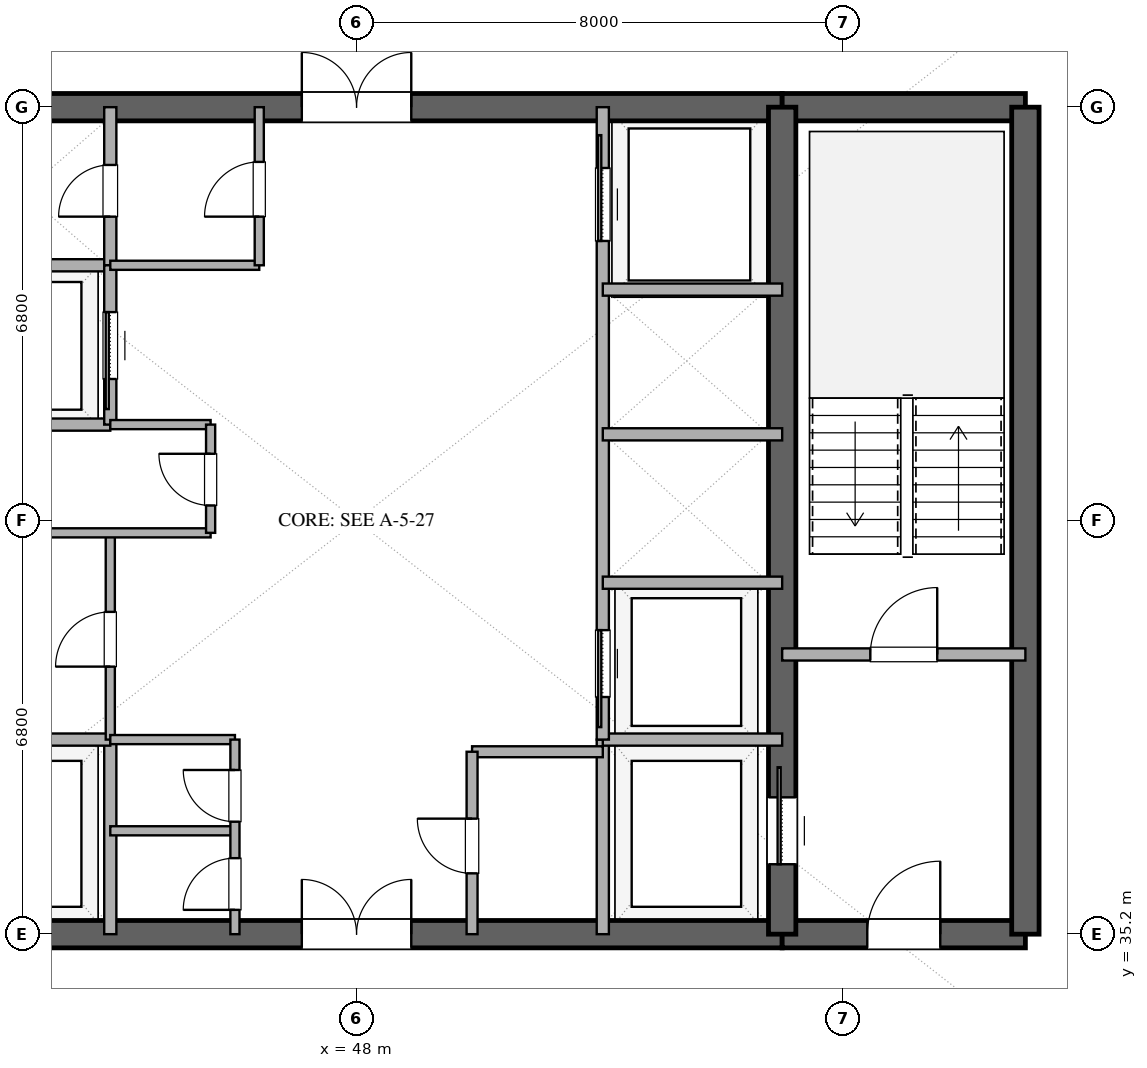
"""IFC4 building model, lengths in metres.
Left out: names, types, materials, properties, quantities, classifications, styles, units other than length and angle.
Written with IfcOpenShell. Run it as: python <this file> out.ifc"""

import sys

from ifc_helpers import new_model, si_unit, direction, frame, frame_2d, origin, place, context, subcontext, project, spatial, rectangle, extrude, element, fill, save


model = new_model("IFC4")
c1 = context("Model", 3, precision=1e-05, world=origin(), true_north=direction((0.0, 1.0)))
c2 = subcontext(c1, "Body", "Model", "MODEL_VIEW")
j1 = project(units=[si_unit("LENGTHUNIT", "METRE"), si_unit("PLANEANGLEUNIT", "RADIAN")], contexts=[c1])
p1 = place(None, origin())
s1 = spatial("IfcSite", under=j1, at=p1, CompositionType="ELEMENT")
p2 = place(p1, origin())
s2 = spatial("IfcBuilding", under=s1, at=p2, CompositionType="ELEMENT")
p3 = place(p2, frame((0.0, 0.0, 179.4)))
s3 = spatial("IfcBuildingStorey", under=s2, at=p3, CompositionType="ELEMENT", Elevation=179.4)
p4 = place(p3, frame((41.0, 35.2, 0.0), z_axis=(0.0, 0.0, 1.0), x_axis=(1.0, 0.0, 0.0)))
e1 = element("IfcWall", 1, at=p4, inside=s3, PredefinedType="SHEAR", context=c2, shape_type="SweptSolid", body=[
    extrude(rectangle(XDim=14.0, YDim=0.45, at=frame_2d((7.0, 0.0))), origin(), (0.0, 0.0, 1.0), 3.38),
])
p5 = place(p4, frame((6.1, 0.0, 0.0)))
e2 = element("IfcOpeningElement", 2, at=p5, cuts=e1, PredefinedType="OPENING", context=c2, shape_type="SweptSolid", body=[
    extrude(rectangle(XDim=1.8, YDim=2.25, at=frame_2d((0.9, 1.125))), frame((0.0, 0.235, 0.0), z_axis=(0.0, -1.0, 0.0), x_axis=(1.0, 0.0, 0.0)), (0.0, 0.0, 1.0), 0.47),
])
p6 = place(p3, frame((55.0, 35.2, 0.0), z_axis=(0.0, 0.0, 1.0), x_axis=(1.0, 0.0, 0.0)))
e3 = element("IfcWall", 3, at=p6, inside=s3, PredefinedType="SHEAR", context=c2, shape_type="SweptSolid", body=[
    extrude(rectangle(XDim=4.0, YDim=0.45, at=frame_2d((2.0, 0.0))), origin(), (0.0, 0.0, 1.0), 3.38),
])
p7 = place(p6, frame((1.4, 0.0, 0.0)))
e4 = element("IfcOpeningElement", 4, at=p7, cuts=e3, PredefinedType="OPENING", context=c2, shape_type="SweptSolid", body=[
    extrude(rectangle(XDim=1.2, YDim=2.15, at=frame_2d((0.6, 1.075))), frame((0.0, 0.235, 0.0), z_axis=(0.0, -1.0, 0.0), x_axis=(1.0, 0.0, 0.0)), (0.0, 0.0, 1.0), 0.47),
])
p8 = place(p3, frame((41.0, 48.8, 0.0), z_axis=(0.0, 0.0, 1.0), x_axis=(1.0, 0.0, 0.0)))
e5 = element("IfcWall", 5, at=p8, inside=s3, PredefinedType="SHEAR", context=c2, shape_type="SweptSolid", body=[
    extrude(rectangle(XDim=14.0, YDim=0.45, at=frame_2d((7.0, 0.0))), origin(), (0.0, 0.0, 1.0), 3.38),
])
p9 = place(p8, frame((6.1, 0.0, 0.0)))
e6 = element("IfcOpeningElement", 6, at=p9, cuts=e5, PredefinedType="OPENING", context=c2, shape_type="SweptSolid", body=[
    extrude(rectangle(XDim=1.8, YDim=2.25, at=frame_2d((0.9, 1.125))), frame((0.0, 0.235, 0.0), z_axis=(0.0, -1.0, 0.0), x_axis=(1.0, 0.0, 0.0)), (0.0, 0.0, 1.0), 0.47),
])
p10 = place(p3, frame((55.0, 48.8, 0.0), z_axis=(0.0, 0.0, 1.0), x_axis=(1.0, 0.0, 0.0)))
e7 = element("IfcWall", 7, at=p10, inside=s3, PredefinedType="SHEAR", context=c2, shape_type="SweptSolid", body=[
    extrude(rectangle(XDim=4.0, YDim=0.45, at=frame_2d((2.0, 0.0))), origin(), (0.0, 0.0, 1.0), 3.38),
])
p11 = place(p3, frame((59.0, 35.2, 0.0), z_axis=(0.0, 0.0, 1.0), x_axis=(0.0, 1.0, 0.0)))
e8 = element("IfcWall", 8, at=p11, inside=s3, PredefinedType="SHEAR", context=c2, shape_type="SweptSolid", body=[
    extrude(rectangle(XDim=13.6, YDim=0.45, at=frame_2d((6.8, 0.0))), origin(), (0.0, 0.0, 1.0), 3.38),
])
p12 = place(p3, frame((55.0, 35.2, 0.0), z_axis=(0.0, 0.0, 1.0), x_axis=(0.0, 1.0, 0.0)))
e9 = element("IfcWall", 9, at=p12, inside=s3, PredefinedType="SHEAR", context=c2, shape_type="SweptSolid", body=[
    extrude(rectangle(XDim=13.6, YDim=0.45, at=frame_2d((6.8, 0.0))), origin(), (0.0, 0.0, 1.0), 3.38),
])
p13 = place(p12, frame((1.15, 0.0, 0.0)))
e10 = element("IfcOpeningElement", 10, at=p13, cuts=e9, PredefinedType="OPENING", context=c2, shape_type="SweptSolid", body=[
    extrude(rectangle(XDim=1.1, YDim=2.2, at=frame_2d((0.55, 1.1))), frame((0.0, 0.235, 0.0), z_axis=(0.0, -1.0, 0.0), x_axis=(1.0, 0.0, 0.0)), (0.0, 0.0, 1.0), 0.47),
])
p14 = place(p3, frame((55.0, 39.8, 0.0), z_axis=(0.0, 0.0, 1.0), x_axis=(1.0, 0.0, 0.0)))
e11 = element("IfcWall", 11, at=p14, inside=s3, PredefinedType="SOLIDWALL", context=c2, shape_type="SweptSolid", body=[
    extrude(rectangle(XDim=4.0, YDim=0.2, at=frame_2d((2.0, 0.0))), origin(), (0.0, 0.0, 1.0), 2.74),
])
p15 = place(p14, frame((1.45, 0.0, 0.0)))
e12 = element("IfcOpeningElement", 12, at=p15, cuts=e11, PredefinedType="OPENING", context=c2, shape_type="SweptSolid", body=[
    extrude(rectangle(XDim=1.1, YDim=2.15, at=frame_2d((0.55, 1.075))), frame((0.0, 0.11, 0.0), z_axis=(0.0, -1.0, 0.0), x_axis=(1.0, 0.0, 0.0)), (0.0, 0.0, 1.0), 0.22),
])
p16 = place(p3, frame((43.95, 35.2, 0.0), z_axis=(0.0, 0.0, 1.0), x_axis=(0.0, 1.0, 0.0)))
e13 = element("IfcWall", 13, at=p16, inside=s3, PredefinedType="SOLIDWALL", context=c2, shape_type="SweptSolid", body=[
    extrude(rectangle(XDim=3.2, YDim=0.2, at=frame_2d((1.6, 0.0))), origin(), (0.0, 0.0, 1.0), 2.74),
])
p17 = place(p3, frame((41.0, 38.4, 0.0), z_axis=(0.0, 0.0, 1.0), x_axis=(1.0, 0.0, 0.0)))
e14 = element("IfcWall", 14, at=p17, inside=s3, PredefinedType="SOLIDWALL", context=c2, shape_type="SweptSolid", body=[
    extrude(rectangle(XDim=2.95, YDim=0.2, at=frame_2d((1.475, 0.0))), origin(), (0.0, 0.0, 1.0), 2.74),
])
p18 = place(p3, frame((52.05, 35.2, 0.0), z_axis=(0.0, 0.0, 1.0), x_axis=(0.0, 1.0, 0.0)))
e15 = element("IfcWall", 15, at=p18, inside=s3, PredefinedType="SOLIDWALL", context=c2, shape_type="SweptSolid", body=[
    extrude(rectangle(XDim=3.2, YDim=0.2, at=frame_2d((1.6, 0.0))), origin(), (0.0, 0.0, 1.0), 2.74),
])
for number, where, z_axis, x_axis in (
    (16, (52.05, 38.4, 0.0), (0.0, 0.0, 1.0), (1.0, 0.0, 0.0)),
    (17, (41.0, 46.2, 0.0), (0.0, 0.0, 1.0), (1.0, 0.0, 0.0)),
):
    element("IfcWall", number, at=place(p3, frame(where, z_axis=z_axis, x_axis=x_axis)), inside=s3, PredefinedType="SOLIDWALL", context=c2, shape_type="SweptSolid", body=[
        extrude(rectangle(XDim=2.95, YDim=0.2, at=frame_2d((1.475, 0.0))), origin(), (0.0, 0.0, 1.0), 2.74),
    ])
p19 = place(p3, frame((43.95, 46.2, 0.0), z_axis=(0.0, 0.0, 1.0), x_axis=(0.0, 1.0, 0.0)))
e18 = element("IfcWall", 18, at=p19, inside=s3, PredefinedType="SOLIDWALL", context=c2, shape_type="SweptSolid", body=[
    extrude(rectangle(XDim=2.6, YDim=0.2, at=frame_2d((1.3, 0.0))), origin(), (0.0, 0.0, 1.0), 2.74),
])
p20 = place(p19, frame((0.8, 0.0, 0.0)))
e19 = element("IfcOpeningElement", 19, at=p20, cuts=e18, PredefinedType="OPENING", context=c2, shape_type="SweptSolid", body=[
    extrude(rectangle(XDim=0.85, YDim=2.15, at=frame_2d((0.425, 1.075))), frame((0.0, 0.11, 0.0), z_axis=(0.0, -1.0, 0.0), x_axis=(1.0, 0.0, 0.0)), (0.0, 0.0, 1.0), 0.22),
])
p21 = place(p3, frame((41.0, 43.58, 0.0), z_axis=(0.0, 0.0, 1.0), x_axis=(1.0, 0.0, 0.0)))
e20 = element("IfcWall", 20, at=p21, inside=s3, PredefinedType="SOLIDWALL", context=c2, shape_type="SweptSolid", body=[
    extrude(rectangle(XDim=2.95, YDim=0.2, at=frame_2d((1.475, 0.0))), origin(), (0.0, 0.0, 1.0), 2.74),
])
p22 = place(p3, frame((43.95, 43.58, 0.0), z_axis=(0.0, 0.0, 1.0), x_axis=(0.0, 1.0, 0.0)))
e21 = element("IfcWall", 21, at=p22, inside=s3, PredefinedType="SOLIDWALL", context=c2, shape_type="SweptSolid", body=[
    extrude(rectangle(XDim=2.62, YDim=0.2, at=frame_2d((1.31, 0.0))), origin(), (0.0, 0.0, 1.0), 2.74),
])
p23 = place(p22, frame((0.75, 0.0, 0.0)))
e22 = element("IfcOpeningElement", 22, at=p23, cuts=e21, PredefinedType="OPENING", context=c2, shape_type="SweptSolid", body=[
    extrude(rectangle(XDim=1.1, YDim=2.2, at=frame_2d((0.55, 1.1))), frame((0.0, 0.11, 0.0), z_axis=(0.0, -1.0, 0.0), x_axis=(1.0, 0.0, 0.0)), (0.0, 0.0, 1.0), 0.22),
])
p24 = place(p3, frame((43.95, 38.4, 0.0), z_axis=(0.0, 0.0, 1.0), x_axis=(0.0, 1.0, 0.0)))
e23 = element("IfcWall", 23, at=p24, inside=s3, PredefinedType="PARTITIONING", context=c2, shape_type="SweptSolid", body=[
    extrude(rectangle(XDim=3.4, YDim=0.15, at=frame_2d((1.7, 0.0))), origin(), (0.0, 0.0, 1.0), 2.74),
])
p25 = place(p24, frame((1.2, 0.0, 0.0)))
e24 = element("IfcOpeningElement", 24, at=p25, cuts=e23, PredefinedType="OPENING", context=c2, shape_type="SweptSolid", body=[
    extrude(rectangle(XDim=0.9, YDim=2.15, at=frame_2d((0.45, 1.075))), frame((0.0, 0.085, 0.0), z_axis=(0.0, -1.0, 0.0), x_axis=(1.0, 0.0, 0.0)), (0.0, 0.0, 1.0), 0.17),
])
p26 = place(p3, frame((41.0, 41.8, 0.0), z_axis=(0.0, 0.0, 1.0), x_axis=(1.0, 0.0, 0.0)))
e25 = element("IfcWall", 25, at=p26, inside=s3, PredefinedType="PARTITIONING", context=c2, shape_type="SweptSolid", body=[
    extrude(rectangle(XDim=4.6, YDim=0.15, at=frame_2d((2.3, 0.0))), origin(), (0.0, 0.0, 1.0), 2.74),
])
p27 = place(p3, frame((43.95, 43.58, 0.0), z_axis=(0.0, 0.0, 1.0), x_axis=(1.0, 0.0, 0.0)))
e26 = element("IfcWall", 26, at=p27, inside=s3, PredefinedType="PARTITIONING", context=c2, shape_type="SweptSolid", body=[
    extrude(rectangle(XDim=1.65, YDim=0.15, at=frame_2d((0.825, 0.0))), origin(), (0.0, 0.0, 1.0), 2.74),
])
p28 = place(p3, frame((45.6, 41.8, 0.0), z_axis=(0.0, 0.0, 1.0), x_axis=(0.0, 1.0, 0.0)))
e27 = element("IfcWall", 27, at=p28, inside=s3, PredefinedType="PARTITIONING", context=c2, shape_type="SweptSolid", body=[
    extrude(rectangle(XDim=1.78, YDim=0.15, at=frame_2d((0.89, 0.0))), origin(), (0.0, 0.0, 1.0), 2.74),
])
p29 = place(p28, frame((0.45, 0.0, 0.0)))
e28 = element("IfcOpeningElement", 28, at=p29, cuts=e27, PredefinedType="OPENING", context=c2, shape_type="SweptSolid", body=[
    extrude(rectangle(XDim=0.85, YDim=2.15, at=frame_2d((0.425, 1.075))), frame((0.0, 0.085, 0.0), z_axis=(0.0, -1.0, 0.0), x_axis=(1.0, 0.0, 0.0)), (0.0, 0.0, 1.0), 0.17),
])
p30 = place(p3, frame((52.05, 38.4, 0.0), z_axis=(0.0, 0.0, 1.0), x_axis=(0.0, 1.0, 0.0)))
e29 = element("IfcWall", 29, at=p30, inside=s3, PredefinedType="SOLIDWALL", context=c2, shape_type="SweptSolid", body=[
    extrude(rectangle(XDim=10.4, YDim=0.2, at=frame_2d((5.2, 0.0))), origin(), (0.0, 0.0, 1.0), 2.74),
])
p31 = place(p30, frame((0.7, 0.0, 0.0)))
e30 = element("IfcOpeningElement", 30, at=p31, cuts=e29, PredefinedType="OPENING", context=c2, shape_type="SweptSolid", body=[
    extrude(rectangle(XDim=1.1, YDim=2.2, at=frame_2d((0.55, 1.1))), frame((0.0, 0.11, 0.0), z_axis=(0.0, -1.0, 0.0), x_axis=(1.0, 0.0, 0.0)), (0.0, 0.0, 1.0), 0.22),
])
p32 = place(p30, frame((8.2, 0.0, 0.0)))
e31 = element("IfcOpeningElement", 31, at=p32, cuts=e29, PredefinedType="OPENING", context=c2, shape_type="SweptSolid", body=[
    extrude(rectangle(XDim=1.2, YDim=2.2, at=frame_2d((0.6, 1.1))), frame((0.0, 0.11, 0.0), z_axis=(0.0, -1.0, 0.0), x_axis=(1.0, 0.0, 0.0)), (0.0, 0.0, 1.0), 0.22),
])
for number, where, z_axis, x_axis in (
    (32, (52.05, 40.98, 0.0), (0.0, 0.0, 1.0), (1.0, 0.0, 0.0)),
    (33, (52.05, 43.42, 0.0), (0.0, 0.0, 1.0), (1.0, 0.0, 0.0)),
    (34, (52.05, 45.8, 0.0), (0.0, 0.0, 1.0), (1.0, 0.0, 0.0)),
):
    element("IfcWall", number, at=place(p3, frame(where, z_axis=z_axis, x_axis=x_axis)), inside=s3, PredefinedType="SOLIDWALL", context=c2, shape_type="SweptSolid", body=[
        extrude(rectangle(XDim=2.95, YDim=0.2, at=frame_2d((1.475, 0.0))), origin(), (0.0, 0.0, 1.0), 2.74),
    ])
for number, where, z_axis, x_axis in (
    (35, (43.95, 36.9, 0.0), (0.0, 0.0, 1.0), (1.0, 0.0, 0.0)),
    (36, (43.95, 38.4, 0.0), (0.0, 0.0, 1.0), (1.0, 0.0, 0.0)),
):
    element("IfcWall", number, at=place(p3, frame(where, z_axis=z_axis, x_axis=x_axis)), inside=s3, PredefinedType="PARTITIONING", context=c2, shape_type="SweptSolid", body=[
        extrude(rectangle(XDim=2.05, YDim=0.15, at=frame_2d((1.025, 0.0))), origin(), (0.0, 0.0, 1.0), 2.74),
    ])
p33 = place(p3, frame((46.0, 35.2, 0.0), z_axis=(0.0, 0.0, 1.0), x_axis=(0.0, 1.0, 0.0)))
e37 = element("IfcWall", 37, at=p33, inside=s3, PredefinedType="PARTITIONING", context=c2, shape_type="SweptSolid", body=[
    extrude(rectangle(XDim=3.2, YDim=0.15, at=frame_2d((1.6, 0.0))), origin(), (0.0, 0.0, 1.0), 2.74),
])
p34 = place(p33, frame((0.4, 0.0, 0.0)))
e38 = element("IfcOpeningElement", 38, at=p34, cuts=e37, PredefinedType="OPENING", context=c2, shape_type="SweptSolid", body=[
    extrude(rectangle(XDim=0.85, YDim=2.15, at=frame_2d((0.425, 1.075))), frame((0.0, 0.085, 0.0), z_axis=(0.0, -1.0, 0.0), x_axis=(1.0, 0.0, 0.0)), (0.0, 0.0, 1.0), 0.17),
])
p35 = place(p33, frame((1.85, 0.0, 0.0)))
e39 = element("IfcOpeningElement", 39, at=p35, cuts=e37, PredefinedType="OPENING", context=c2, shape_type="SweptSolid", body=[
    extrude(rectangle(XDim=0.85, YDim=2.15, at=frame_2d((0.425, 1.075))), frame((0.0, 0.085, 0.0), z_axis=(0.0, -1.0, 0.0), x_axis=(1.0, 0.0, 0.0)), (0.0, 0.0, 1.0), 0.17),
])
p36 = place(p3, frame((43.95, 46.2, 0.0), z_axis=(0.0, 0.0, 1.0), x_axis=(1.0, 0.0, 0.0)))
e40 = element("IfcWall", 40, at=p36, inside=s3, PredefinedType="PARTITIONING", context=c2, shape_type="SweptSolid", body=[
    extrude(rectangle(XDim=2.45, YDim=0.15, at=frame_2d((1.225, 0.0))), origin(), (0.0, 0.0, 1.0), 2.74),
])
p37 = place(p3, frame((46.4, 46.2, 0.0), z_axis=(0.0, 0.0, 1.0), x_axis=(0.0, 1.0, 0.0)))
e41 = element("IfcWall", 41, at=p37, inside=s3, PredefinedType="PARTITIONING", context=c2, shape_type="SweptSolid", body=[
    extrude(rectangle(XDim=2.6, YDim=0.15, at=frame_2d((1.3, 0.0))), origin(), (0.0, 0.0, 1.0), 2.74),
])
p38 = place(p37, frame((0.8, 0.0, 0.0)))
e42 = element("IfcOpeningElement", 42, at=p38, cuts=e41, PredefinedType="OPENING", context=c2, shape_type="SweptSolid", body=[
    extrude(rectangle(XDim=0.9, YDim=2.15, at=frame_2d((0.45, 1.075))), frame((0.0, 0.085, 0.0), z_axis=(0.0, -1.0, 0.0), x_axis=(1.0, 0.0, 0.0)), (0.0, 0.0, 1.0), 0.17),
])
p39 = place(p3, frame((49.9, 38.2, 0.0), z_axis=(0.0, 0.0, 1.0), x_axis=(1.0, 0.0, 0.0)))
e43 = element("IfcWall", 43, at=p39, inside=s3, PredefinedType="PLUMBINGWALL", context=c2, shape_type="SweptSolid", body=[
    extrude(rectangle(XDim=2.15, YDim=0.18, at=frame_2d((1.075, 0.0))), origin(), (0.0, 0.0, 1.0), 2.74),
])
p40 = place(p3, frame((49.9, 35.2, 0.0), z_axis=(0.0, 0.0, 1.0), x_axis=(0.0, 1.0, 0.0)))
e44 = element("IfcWall", 44, at=p40, inside=s3, PredefinedType="PLUMBINGWALL", context=c2, shape_type="SweptSolid", body=[
    extrude(rectangle(XDim=3.0, YDim=0.18, at=frame_2d((1.5, 0.0))), origin(), (0.0, 0.0, 1.0), 2.74),
])
p41 = place(p40, frame((1.0, 0.0, 0.0)))
e45 = element("IfcOpeningElement", 45, at=p41, cuts=e44, PredefinedType="OPENING", context=c2, shape_type="SweptSolid", body=[
    extrude(rectangle(XDim=0.9, YDim=2.1, at=frame_2d((0.45, 1.05))), frame((0.0, 0.1, 0.0), z_axis=(0.0, -1.0, 0.0), x_axis=(1.0, 0.0, 0.0)), (0.0, 0.0, 1.0), 0.2),
])
p42 = place(p13, origin())
e46 = element("IfcDoor", 46, at=p42, inside=s3, OperationType="SLIDING_TO_RIGHT", PredefinedType="DOOR", context=c2, shape_type="SweptSolid", body=[
    extrude(rectangle(XDim=1.1, YDim=2.2, at=frame_2d((0.55, 1.1))), frame((0.0, 0.025, 0.0), z_axis=(0.0, -1.0, 0.0), x_axis=(1.0, 0.0, 0.0)), (0.0, 0.0, 1.0), 0.05),
])
fill(e10, e46)
p43 = place(p7, origin())
e47 = element("IfcDoor", 47, at=p43, inside=s3, OperationType="SINGLE_SWING_RIGHT", PredefinedType="DOOR", context=c2, shape_type="SweptSolid", body=[
    extrude(rectangle(XDim=1.2, YDim=2.15, at=frame_2d((0.6, 1.075))), frame((0.0, 0.025, 0.0), z_axis=(0.0, -1.0, 0.0), x_axis=(1.0, 0.0, 0.0)), (0.0, 0.0, 1.0), 0.05),
])
fill(e4, e47)
p44 = place(p5, origin())
e48 = element("IfcDoor", 48, at=p44, inside=s3, OperationType="DOUBLE_DOOR_SINGLE_SWING", PredefinedType="DOOR", context=c2, shape_type="SweptSolid", body=[
    extrude(rectangle(XDim=1.8, YDim=2.25, at=frame_2d((0.9, 1.125))), frame((0.0, 0.025, 0.0), z_axis=(0.0, -1.0, 0.0), x_axis=(1.0, 0.0, 0.0)), (0.0, 0.0, 1.0), 0.05),
])
fill(e2, e48)
p45 = place(p9, origin())
e49 = element("IfcDoor", 49, at=p45, inside=s3, OperationType="DOUBLE_DOOR_SINGLE_SWING", PredefinedType="DOOR", context=c2, shape_type="SweptSolid", body=[
    extrude(rectangle(XDim=1.8, YDim=2.25, at=frame_2d((0.9, 1.125))), frame((0.0, 0.025, 0.0), z_axis=(0.0, -1.0, 0.0), x_axis=(1.0, 0.0, 0.0)), (0.0, 0.0, 1.0), 0.05),
])
fill(e6, e49)
p46 = place(p15, origin())
e50 = element("IfcDoor", 50, at=p46, inside=s3, OperationType="SINGLE_SWING_RIGHT", PredefinedType="DOOR", context=c2, shape_type="SweptSolid", body=[
    extrude(rectangle(XDim=1.1, YDim=2.15, at=frame_2d((0.55, 1.075))), frame((0.0, 0.025, 0.0), z_axis=(0.0, -1.0, 0.0), x_axis=(1.0, 0.0, 0.0)), (0.0, 0.0, 1.0), 0.05),
])
fill(e12, e50)
p47 = place(p20, origin())
e51 = element("IfcDoor", 51, at=p47, inside=s3, OperationType="SINGLE_SWING_LEFT", PredefinedType="DOOR", context=c2, shape_type="SweptSolid", body=[
    extrude(rectangle(XDim=0.85, YDim=2.15, at=frame_2d((0.425, 1.075))), frame((0.0, 0.025, 0.0), z_axis=(0.0, -1.0, 0.0), x_axis=(1.0, 0.0, 0.0)), (0.0, 0.0, 1.0), 0.05),
])
fill(e19, e51)
p48 = place(p23, origin())
e52 = element("IfcDoor", 52, at=p48, inside=s3, OperationType="SLIDING_TO_LEFT", PredefinedType="DOOR", context=c2, shape_type="SweptSolid", body=[
    extrude(rectangle(XDim=1.1, YDim=2.2, at=frame_2d((0.55, 1.1))), frame((0.0, 0.025, 0.0), z_axis=(0.0, -1.0, 0.0), x_axis=(1.0, 0.0, 0.0)), (0.0, 0.0, 1.0), 0.05),
])
fill(e22, e52)
p49 = place(p25, origin())
e53 = element("IfcDoor", 53, at=p49, inside=s3, OperationType="SINGLE_SWING_LEFT", PredefinedType="DOOR", context=c2, shape_type="SweptSolid", body=[
    extrude(rectangle(XDim=0.9, YDim=2.15, at=frame_2d((0.45, 1.075))), frame((0.0, 0.025, 0.0), z_axis=(0.0, -1.0, 0.0), x_axis=(1.0, 0.0, 0.0)), (0.0, 0.0, 1.0), 0.05),
])
fill(e24, e53)
p50 = place(p29, origin())
e54 = element("IfcDoor", 54, at=p50, inside=s3, OperationType="SINGLE_SWING_RIGHT", PredefinedType="DOOR", context=c2, shape_type="SweptSolid", body=[
    extrude(rectangle(XDim=0.85, YDim=2.15, at=frame_2d((0.425, 1.075))), frame((0.0, 0.025, 0.0), z_axis=(0.0, -1.0, 0.0), x_axis=(1.0, 0.0, 0.0)), (0.0, 0.0, 1.0), 0.05),
])
fill(e28, e54)
p51 = place(p31, origin())
e55 = element("IfcDoor", 55, at=p51, inside=s3, OperationType="SLIDING_TO_LEFT", PredefinedType="DOOR", context=c2, shape_type="SweptSolid", body=[
    extrude(rectangle(XDim=1.1, YDim=2.2, at=frame_2d((0.55, 1.1))), frame((0.0, 0.025, 0.0), z_axis=(0.0, -1.0, 0.0), x_axis=(1.0, 0.0, 0.0)), (0.0, 0.0, 1.0), 0.05),
])
fill(e30, e55)
p52 = place(p32, origin())
e56 = element("IfcDoor", 56, at=p52, inside=s3, OperationType="SLIDING_TO_RIGHT", PredefinedType="DOOR", context=c2, shape_type="SweptSolid", body=[
    extrude(rectangle(XDim=1.2, YDim=2.2, at=frame_2d((0.6, 1.1))), frame((0.0, 0.025, 0.0), z_axis=(0.0, -1.0, 0.0), x_axis=(1.0, 0.0, 0.0)), (0.0, 0.0, 1.0), 0.05),
])
fill(e31, e56)
p53 = place(p34, origin())
e57 = element("IfcDoor", 57, at=p53, inside=s3, OperationType="SINGLE_SWING_LEFT", PredefinedType="DOOR", context=c2, shape_type="SweptSolid", body=[
    extrude(rectangle(XDim=0.85, YDim=2.15, at=frame_2d((0.425, 1.075))), frame((0.0, 0.025, 0.0), z_axis=(0.0, -1.0, 0.0), x_axis=(1.0, 0.0, 0.0)), (0.0, 0.0, 1.0), 0.05),
])
fill(e38, e57)
p54 = place(p35, origin())
e58 = element("IfcDoor", 58, at=p54, inside=s3, OperationType="SINGLE_SWING_RIGHT", PredefinedType="DOOR", context=c2, shape_type="SweptSolid", body=[
    extrude(rectangle(XDim=0.85, YDim=2.15, at=frame_2d((0.425, 1.075))), frame((0.0, 0.025, 0.0), z_axis=(0.0, -1.0, 0.0), x_axis=(1.0, 0.0, 0.0)), (0.0, 0.0, 1.0), 0.05),
])
fill(e39, e58)
p55 = place(p38, origin())
e59 = element("IfcDoor", 59, at=p55, inside=s3, OperationType="SINGLE_SWING_LEFT", PredefinedType="DOOR", context=c2, shape_type="SweptSolid", body=[
    extrude(rectangle(XDim=0.9, YDim=2.15, at=frame_2d((0.45, 1.075))), frame((0.0, 0.025, 0.0), z_axis=(0.0, -1.0, 0.0), x_axis=(1.0, 0.0, 0.0)), (0.0, 0.0, 1.0), 0.05),
])
fill(e42, e59)
p56 = place(p41, origin())
e60 = element("IfcDoor", 60, at=p56, inside=s3, OperationType="SINGLE_SWING_RIGHT", PredefinedType="DOOR", context=c2, shape_type="SweptSolid", body=[
    extrude(rectangle(XDim=0.9, YDim=2.1, at=frame_2d((0.45, 1.05))), frame((0.0, 0.025, 0.0), z_axis=(0.0, -1.0, 0.0), x_axis=(1.0, 0.0, 0.0)), (0.0, 0.0, 1.0), 0.05),
])
fill(e45, e60)
save(model, sys.argv[1])
